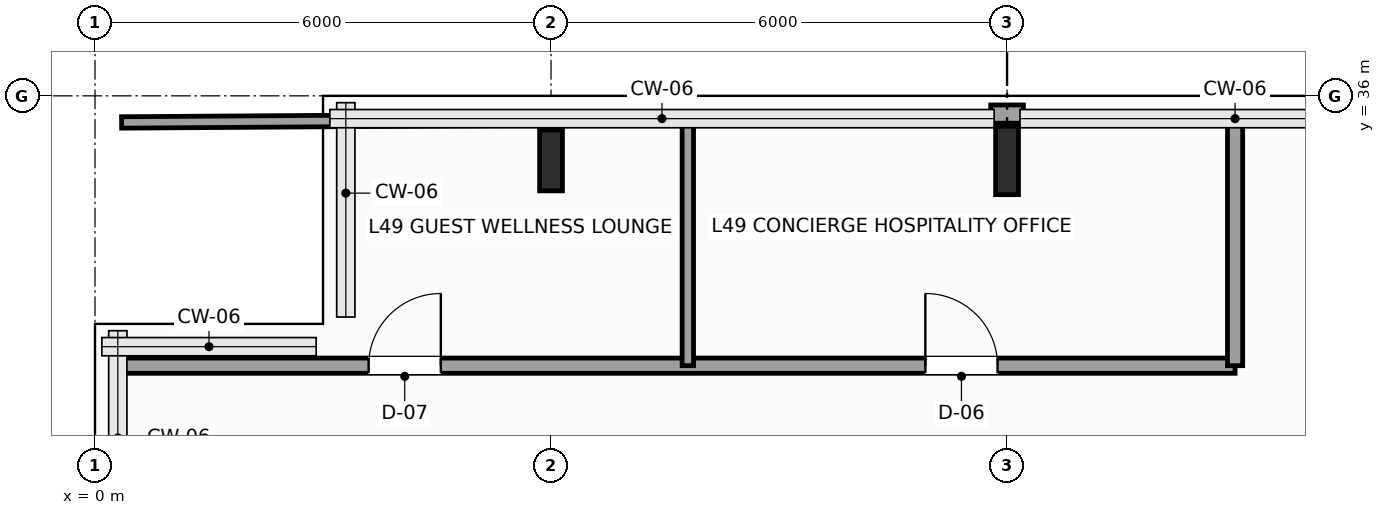
"""IFC4 building model, lengths in metres.
Left out: names, types, materials, properties, quantities, classifications, styles, units other than length and angle.
Written with IfcOpenShell. Run it as: python <this file> out.ifc"""

import sys

from ifc_helpers import new_model, si_unit, direction, frame, frame_2d, origin, origin_2d, place, context, subcontext, project, spatial, rectangle, i_section, extrude, element, fill, save


model = new_model("IFC4")
c1 = context("Model", 3, precision=1e-05, world=origin(), true_north=direction((0.0, 1.0)))
c2 = subcontext(c1, "Body", "Model", "MODEL_VIEW")
j1 = project(units=[si_unit("LENGTHUNIT", "METRE"), si_unit("PLANEANGLEUNIT", "RADIAN")], contexts=[c1])
p1 = place(None, origin())
s1 = spatial("IfcSite", under=j1, at=p1, CompositionType="ELEMENT")
p2 = place(p1, origin())
s2 = spatial("IfcBuilding", under=s1, at=p2, CompositionType="ELEMENT")
p3 = place(p2, frame((0.0, 0.0, 199.2)))
s3 = spatial("IfcBuildingStorey", under=s2, at=p3, CompositionType="ELEMENT", Elevation=199.2)
p4 = place(p3, frame((6.0, 35.15, 0.0), z_axis=(0.0, 0.0, 1.0), x_axis=(1.0, 0.0, 0.0)))
e1 = element("IfcColumn", 1, at=p4, inside=s3, PredefinedType="COLUMN", context=c2, shape_type="SweptSolid", body=[
    extrude(i_section(OverallWidth=0.3, OverallDepth=0.8, WebThickness=0.018, FlangeThickness=0.033, FilletRadius=0.03, at=origin_2d()), origin(), (0.0, 0.0, 1.0), 4.8),
])
p5 = place(p3, frame((12.0, 35.15, 0.0), z_axis=(0.0, 0.0, 1.0), x_axis=(1.0, 0.0, 0.0)))
e2 = element("IfcColumn", 2, at=p5, inside=s3, PredefinedType="COLUMN", context=c2, shape_type="SweptSolid", body=[
    extrude(i_section(OverallWidth=0.3, OverallDepth=0.9, WebThickness=0.019, FlangeThickness=0.035, FilletRadius=0.03, at=origin_2d()), origin(), (0.0, 0.0, 1.0), 4.8),
])
p6 = place(p3, frame((11.785, 35.76, 0.0), z_axis=(0.0, 0.0, 1.0), x_axis=(1.0, 0.0, 0.0)))
e3 = element("IfcWall", 3, at=p6, inside=s3, PredefinedType="SOLIDWALL", context=c2, shape_type="SweptSolid", body=[
    extrude(rectangle(XDim=0.43, YDim=0.24, at=frame_2d((0.215, 0.0))), origin(), (0.0, 0.0, 1.0), 4.5),
])
p7 = place(p3, frame((0.3, 32.45, 0.0), z_axis=(0.0, 0.0, 1.0), x_axis=(1.0, 0.0, 0.0)))
e4 = element("IfcWall", 4, at=p7, inside=s3, PredefinedType="SOLIDWALL", context=c2, shape_type="SweptSolid", body=[
    extrude(rectangle(XDim=14.7, YDim=0.2, at=frame_2d((7.35, 0.0))), origin(), (0.0, 0.0, 1.0), 4.5),
])
p8 = place(p7, frame((3.3, 0.0, 0.0)))
e5 = element("IfcOpeningElement", 5, at=p8, cuts=e4, PredefinedType="OPENING", context=c2, shape_type="SweptSolid", body=[
    extrude(rectangle(XDim=0.95, YDim=2.15, at=frame_2d((0.475, 1.075))), frame((0.0, 0.11, 0.0), z_axis=(0.0, -1.0, 0.0), x_axis=(1.0, 0.0, 0.0)), (0.0, 0.0, 1.0), 0.22),
])
p9 = place(p7, frame((10.625, 0.0, 0.0)))
e6 = element("IfcOpeningElement", 6, at=p9, cuts=e4, PredefinedType="OPENING", context=c2, shape_type="SweptSolid", body=[
    extrude(rectangle(XDim=0.95, YDim=2.15, at=frame_2d((0.475, 1.075))), frame((0.0, 0.11, 0.0), z_axis=(0.0, -1.0, 0.0), x_axis=(1.0, 0.0, 0.0)), (0.0, 0.0, 1.0), 0.22),
])
p10 = place(p3, frame((15.0, 32.45, 0.0), z_axis=(0.0, 0.0, 1.0), x_axis=(0.0, 1.0, 0.0)))
e7 = element("IfcWall", 7, at=p10, inside=s3, PredefinedType="SOLIDWALL", context=c2, shape_type="SweptSolid", body=[
    extrude(rectangle(XDim=3.25, YDim=0.2, at=frame_2d((1.625, 0.0))), origin(), (0.0, 0.0, 1.0), 4.5),
])
p11 = place(p3, frame((0.35, 35.65, 0.0), z_axis=(0.0, 0.0, 1.0), x_axis=(0.999977434951, 0.006717855945, 0.0)))
e8 = element("IfcWall", 8, at=p11, inside=s3, PredefinedType="PARTITIONING", context=c2, shape_type="SweptSolid", body=[
    extrude(rectangle(XDim=7.45, YDim=0.15, at=frame_2d((3.725, 0.0))), origin(), (0.0, 0.0, 1.0), 4.5),
])
p12 = place(p3, frame((7.8, 32.45, 0.0), z_axis=(0.0, 0.0, 1.0), x_axis=(0.0, 1.0, 0.0)))
e9 = element("IfcWall", 9, at=p12, inside=s3, PredefinedType="PARTITIONING", context=c2, shape_type="SweptSolid", body=[
    extrude(rectangle(XDim=3.25, YDim=0.15, at=frame_2d((1.625, 0.0))), origin(), (0.0, 0.0, 1.0), 4.5),
])
p13 = place(p8, origin())
e10 = element("IfcDoor", 10, at=p13, inside=s3, OperationType="SINGLE_SWING_RIGHT", PredefinedType="DOOR", context=c2, shape_type="SweptSolid", body=[
    extrude(rectangle(XDim=0.95, YDim=2.15, at=frame_2d((0.475, 1.075))), frame((0.0, 0.025, 0.0), z_axis=(0.0, -1.0, 0.0), x_axis=(1.0, 0.0, 0.0)), (0.0, 0.0, 1.0), 0.05),
])
fill(e5, e10)
p14 = place(p9, origin())
e11 = element("IfcDoor", 11, at=p14, inside=s3, OperationType="SINGLE_SWING_LEFT", PredefinedType="DOOR", context=c2, shape_type="SweptSolid", body=[
    extrude(rectangle(XDim=0.95, YDim=2.15, at=frame_2d((0.475, 1.075))), frame((0.0, 0.025, 0.0), z_axis=(0.0, -1.0, 0.0), x_axis=(1.0, 0.0, 0.0)), (0.0, 0.0, 1.0), 0.05),
])
fill(e6, e11)
save(model, sys.argv[1])
